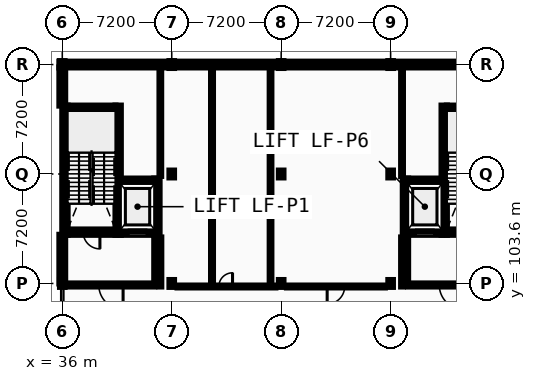
"""IFC4 building model, lengths in metres.
Left out: names, types, materials, properties, quantities, classifications, styles, units other than length and angle.
Written with IfcOpenShell. Run it as: python <this file> out.ifc"""

import sys

from ifc_helpers import new_model, si_unit, direction, frame, frame_2d, origin, origin_2d, place, context, subcontext, project, spatial, rectangle, i_section, extrude, element, fill, save


model = new_model("IFC4")
c1 = context("Model", 3, precision=1e-05, world=origin(), true_north=direction((0.0, 1.0)))
c2 = subcontext(c1, "Body", "Model", "MODEL_VIEW")
j1 = project(units=[si_unit("LENGTHUNIT", "METRE"), si_unit("PLANEANGLEUNIT", "RADIAN")], contexts=[c1])
p1 = place(None, origin())
s1 = spatial("IfcSite", under=j1, at=p1, CompositionType="ELEMENT")
p2 = place(p1, origin())
s2 = spatial("IfcBuilding", under=s1, at=p2, CompositionType="ELEMENT")
p3 = place(p2, frame((0.0, 0.0, 5.2)))
s3 = spatial("IfcBuildingStorey", under=s2, at=p3, CompositionType="ELEMENT", Elevation=5.2)
for number, where, z_axis, x_axis in (
    (1, (36.0, 103.6, 0.0), (0.0, 0.0, 1.0), (1.0, 0.0, 0.0)),
    (2, (36.0, 118.0, 0.0), (0.0, 0.0, 1.0), (1.0, 0.0, 0.0)),
    (3, (43.2, 103.6, 0.0), (0.0, 0.0, 1.0), (1.0, 0.0, 0.0)),
    (4, (43.2, 110.8, 0.0), (0.0, 0.0, 1.0), (1.0, 0.0, 0.0)),
    (5, (43.2, 118.0, 0.0), (0.0, 0.0, 1.0), (1.0, 0.0, 0.0)),
    (6, (50.4, 103.6, 0.0), (0.0, 0.0, 1.0), (1.0, 0.0, 0.0)),
    (7, (50.4, 110.8, 0.0), (0.0, 0.0, 1.0), (1.0, 0.0, 0.0)),
    (8, (50.4, 118.0, 0.0), (0.0, 0.0, 1.0), (1.0, 0.0, 0.0)),
    (9, (57.6, 103.6, 0.0), (0.0, 0.0, 1.0), (1.0, 0.0, 0.0)),
    (10, (57.6, 110.8, 0.0), (0.0, 0.0, 1.0), (1.0, 0.0, 0.0)),
    (11, (57.6, 118.0, 0.0), (0.0, 0.0, 1.0), (1.0, 0.0, 0.0)),
):
    element("IfcColumn", number, at=place(p3, frame(where, z_axis=z_axis, x_axis=x_axis)), inside=s3, PredefinedType="COLUMN", context=c2, shape_type="SweptSolid", body=[
        extrude(i_section(OverallWidth=0.3, OverallDepth=0.45, WebThickness=0.014, FlangeThickness=0.026, FilletRadius=0.027, at=origin_2d()), origin(), (0.0, 0.0, 1.0), 4.4),
    ])
p4 = place(p3, frame((43.2, 118.0, 0.0), z_axis=(0.0, 0.0, 1.0), x_axis=(-1.0, 0.0, 0.0)))
e12 = element("IfcWall", 12, at=p4, inside=s3, PredefinedType="STANDARD", context=c2, shape_type="SweptSolid", body=[
    extrude(rectangle(XDim=7.39, YDim=0.38, at=frame_2d((3.695, 0.0))), origin(), (0.0, 0.0, 1.0), 3.88),
])
p5 = place(p4, frame((1.651, 0.0, 0.95)))
e13 = element("IfcOpeningElement", 13, at=p5, cuts=e12, PredefinedType="OPENING", context=c2, shape_type="SweptSolid", body=[
    extrude(rectangle(XDim=1.132, YDim=1.368, at=frame_2d((0.566, 0.684))), frame((0.0, 0.2, 0.0), z_axis=(0.0, -1.0, 0.0), x_axis=(1.0, 0.0, 0.0)), (0.0, 0.0, 1.0), 0.4),
])
p6 = place(p4, frame((4.607, 0.0, 0.95)))
e14 = element("IfcOpeningElement", 14, at=p6, cuts=e12, PredefinedType="OPENING", context=c2, shape_type="SweptSolid", body=[
    extrude(rectangle(XDim=1.132, YDim=1.368, at=frame_2d((0.566, 0.684))), frame((0.0, 0.2, 0.0), z_axis=(0.0, -1.0, 0.0), x_axis=(1.0, 0.0, 0.0)), (0.0, 0.0, 1.0), 0.4),
])
p7 = place(p3, frame((50.4, 118.0, 0.0), z_axis=(0.0, 0.0, 1.0), x_axis=(-1.0, 0.0, 0.0)))
e15 = element("IfcWall", 15, at=p7, inside=s3, PredefinedType="STANDARD", context=c2, shape_type="SweptSolid", body=[
    extrude(rectangle(XDim=7.2, YDim=0.38, at=frame_2d((3.6, 0.0))), origin(), (0.0, 0.0, 1.0), 3.88),
])
p8 = place(p7, frame((1.577, 0.0, 0.95)))
e16 = element("IfcOpeningElement", 16, at=p8, cuts=e15, PredefinedType="OPENING", context=c2, shape_type="SweptSolid", body=[
    extrude(rectangle(XDim=1.166, YDim=1.368, at=frame_2d((0.583, 0.684))), frame((0.0, 0.2, 0.0), z_axis=(0.0, -1.0, 0.0), x_axis=(1.0, 0.0, 0.0)), (0.0, 0.0, 1.0), 0.4),
])
p9 = place(p3, frame((57.6, 118.0, 0.0), z_axis=(0.0, 0.0, 1.0), x_axis=(-1.0, 0.0, 0.0)))
e17 = element("IfcWall", 17, at=p9, inside=s3, PredefinedType="STANDARD", context=c2, shape_type="SweptSolid", body=[
    extrude(rectangle(XDim=7.2, YDim=0.38, at=frame_2d((3.6, 0.0))), origin(), (0.0, 0.0, 1.0), 3.88),
])
p10 = place(p9, frame((1.56, 0.0, 0.95)))
e18 = element("IfcOpeningElement", 18, at=p10, cuts=e17, PredefinedType="OPENING", context=c2, shape_type="SweptSolid", body=[
    extrude(rectangle(XDim=1.2, YDim=1.368, at=frame_2d((0.6, 0.684))), frame((0.0, 0.2, 0.0), z_axis=(0.0, -1.0, 0.0), x_axis=(1.0, 0.0, 0.0)), (0.0, 0.0, 1.0), 0.4),
])
p11 = place(p9, frame((4.44, 0.0, 0.95)))
e19 = element("IfcOpeningElement", 19, at=p11, cuts=e17, PredefinedType="OPENING", context=c2, shape_type="SweptSolid", body=[
    extrude(rectangle(XDim=1.2, YDim=1.368, at=frame_2d((0.6, 0.684))), frame((0.0, 0.2, 0.0), z_axis=(0.0, -1.0, 0.0), x_axis=(1.0, 0.0, 0.0)), (0.0, 0.0, 1.0), 0.4),
])
p12 = place(p3, frame((64.99, 118.0, 0.0), z_axis=(0.0, 0.0, 1.0), x_axis=(-1.0, 0.0, 0.0)))
e20 = element("IfcWall", 20, at=p12, inside=s3, PredefinedType="STANDARD", context=c2, shape_type="SweptSolid", body=[
    extrude(rectangle(XDim=7.39, YDim=0.38, at=frame_2d((3.695, 0.0))), origin(), (0.0, 0.0, 1.0), 3.88),
])
p13 = place(p12, frame((1.6, 0.0, 0.95)))
e21 = element("IfcOpeningElement", 21, at=p13, cuts=e20, PredefinedType="OPENING", context=c2, shape_type="SweptSolid", body=[
    extrude(rectangle(XDim=1.234, YDim=1.368, at=frame_2d((0.617, 0.684))), frame((0.0, 0.2, 0.0), z_axis=(0.0, -1.0, 0.0), x_axis=(1.0, 0.0, 0.0)), (0.0, 0.0, 1.0), 0.4),
])
p14 = place(p12, frame((4.556, 0.0, 0.95)))
e22 = element("IfcOpeningElement", 22, at=p14, cuts=e20, PredefinedType="OPENING", context=c2, shape_type="SweptSolid", body=[
    extrude(rectangle(XDim=1.234, YDim=1.368, at=frame_2d((0.617, 0.684))), frame((0.0, 0.2, 0.0), z_axis=(0.0, -1.0, 0.0), x_axis=(1.0, 0.0, 0.0)), (0.0, 0.0, 1.0), 0.4),
])
p15 = place(p3, frame((36.0, 106.8, 0.0), z_axis=(0.0, 0.0, 1.0), x_axis=(0.0, -1.0, 0.0)))
e23 = element("IfcWall", 23, at=p15, inside=s3, PredefinedType="STANDARD", context=c2, shape_type="SweptSolid", body=[
    extrude(rectangle(XDim=3.2, YDim=0.38, at=frame_2d((1.6, 0.0))), origin(), (0.0, 0.0, 1.0), 4.185),
])
p16 = place(p15, frame((1.17, 0.0, 0.95)))
e24 = element("IfcOpeningElement", 24, at=p16, cuts=e23, PredefinedType="OPENING", context=c2, shape_type="SweptSolid", body=[
    extrude(rectangle(XDim=0.86, YDim=1.404, at=frame_2d((0.43, 0.702))), frame((0.0, 0.2, 0.0), z_axis=(0.0, -1.0, 0.0), x_axis=(1.0, 0.0, 0.0)), (0.0, 0.0, 1.0), 0.4),
])
p17 = place(p3, frame((36.0, 117.81, 0.0), z_axis=(0.0, 0.0, 1.0), x_axis=(0.0, -1.0, 0.0)))
e25 = element("IfcWall", 25, at=p17, inside=s3, PredefinedType="STANDARD", context=c2, shape_type="SweptSolid", body=[
    extrude(rectangle(XDim=2.51, YDim=0.38, at=frame_2d((1.255, 0.0))), origin(), (0.0, 0.0, 1.0), 4.185),
])
p18 = place(p3, frame((36.35, 106.975, 0.0), z_axis=(0.0, 0.0, 1.0), x_axis=(1.0, 0.0, 0.0)))
e26 = element("IfcWall", 26, at=p18, inside=s3, PredefinedType="SHEAR", context=c2, shape_type="SweptSolid", body=[
    extrude(rectangle(XDim=3.15, YDim=0.35, at=frame_2d((1.575, 0.0))), origin(), (0.0, 0.0, 1.0), 4.185),
])
p19 = place(p18, frame((1.025, 0.0, 0.0)))
e27 = element("IfcOpeningElement", 27, at=p19, cuts=e26, PredefinedType="OPENING", context=c2, shape_type="SweptSolid", body=[
    extrude(rectangle(XDim=1.1, YDim=2.15, at=frame_2d((0.55, 1.075))), frame((0.0, 0.185, 0.0), z_axis=(0.0, -1.0, 0.0), x_axis=(1.0, 0.0, 0.0)), (0.0, 0.0, 1.0), 0.37),
])
p20 = place(p3, frame((36.35, 115.125, 0.0), z_axis=(0.0, 0.0, 1.0), x_axis=(1.0, 0.0, 0.0)))
e28 = element("IfcWall", 28, at=p20, inside=s3, PredefinedType="SHEAR", context=c2, shape_type="SweptSolid", body=[
    extrude(rectangle(XDim=3.15, YDim=0.35, at=frame_2d((1.575, 0.0))), origin(), (0.0, 0.0, 1.0), 4.185),
])
for number, where, z_axis, x_axis in (
    (29, (36.175, 106.8, 0.0), (0.0, 0.0, 1.0), (0.0, 1.0, 0.0)),
    (30, (39.675, 106.8, 0.0), (0.0, 0.0, 1.0), (0.0, 1.0, 0.0)),
):
    element("IfcWall", number, at=place(p3, frame(where, z_axis=z_axis, x_axis=x_axis)), inside=s3, PredefinedType="SHEAR", context=c2, shape_type="SweptSolid", body=[
        extrude(rectangle(XDim=8.5, YDim=0.35, at=frame_2d((4.25, 0.0))), origin(), (0.0, 0.0, 1.0), 4.185),
    ])
p21 = place(p3, frame((39.85, 106.975, 0.0), z_axis=(0.0, 0.0, 1.0), x_axis=(1.0, 0.0, 0.0)))
e31 = element("IfcWall", 31, at=p21, inside=s3, PredefinedType="SHEAR", context=c2, shape_type="SweptSolid", body=[
    extrude(rectangle(XDim=2.2, YDim=0.35, at=frame_2d((1.1, 0.0))), origin(), (0.0, 0.0, 1.0), 4.185),
])
p22 = place(p21, frame((0.5, 0.0, 0.0)))
e32 = element("IfcOpeningElement", 32, at=p22, cuts=e31, PredefinedType="OPENING", context=c2, shape_type="SweptSolid", body=[
    extrude(rectangle(XDim=1.2, YDim=2.2, at=frame_2d((0.6, 1.1))), frame((0.0, 0.185, 0.0), z_axis=(0.0, -1.0, 0.0), x_axis=(1.0, 0.0, 0.0)), (0.0, 0.0, 1.0), 0.37),
])
p23 = place(p3, frame((39.85, 110.325, 0.0), z_axis=(0.0, 0.0, 1.0), x_axis=(1.0, 0.0, 0.0)))
e33 = element("IfcWall", 33, at=p23, inside=s3, PredefinedType="SHEAR", context=c2, shape_type="SweptSolid", body=[
    extrude(rectangle(XDim=2.2, YDim=0.35, at=frame_2d((1.1, 0.0))), origin(), (0.0, 0.0, 1.0), 4.185),
])
p24 = place(p3, frame((42.225, 106.8, 0.0), z_axis=(0.0, 0.0, 1.0), x_axis=(0.0, 1.0, 0.0)))
e34 = element("IfcWall", 34, at=p24, inside=s3, PredefinedType="SHEAR", context=c2, shape_type="SweptSolid", body=[
    extrude(rectangle(XDim=3.7, YDim=0.35, at=frame_2d((1.85, 0.0))), origin(), (0.0, 0.0, 1.0), 4.185),
])
p25 = place(p3, frame((36.35, 103.5, 0.0), z_axis=(0.0, 0.0, 1.0), x_axis=(1.0, 0.0, 0.0)))
e35 = element("IfcWall", 35, at=p25, inside=s3, PredefinedType="PARTITIONING", context=c2, shape_type="SweptSolid", body=[
    extrude(rectangle(XDim=5.7, YDim=0.2, at=frame_2d((2.85, 0.0))), origin(), (0.0, 0.0, 1.0), 3.88),
])
p26 = place(p25, frame((2.05, 0.0, 0.0)))
e36 = element("IfcOpeningElement", 36, at=p26, cuts=e35, PredefinedType="OPENING", context=c2, shape_type="SweptSolid", body=[
    extrude(rectangle(XDim=1.6, YDim=2.2, at=frame_2d((0.8, 1.1))), frame((0.0, 0.11, 0.0), z_axis=(0.0, -1.0, 0.0), x_axis=(1.0, 0.0, 0.0)), (0.0, 0.0, 1.0), 0.22),
])
p27 = place(p3, frame((42.15, 103.6, 0.0), z_axis=(0.0, 0.0, 1.0), x_axis=(0.0, 1.0, 0.0)))
e37 = element("IfcWall", 37, at=p27, inside=s3, PredefinedType="PARTITIONING", context=c2, shape_type="SweptSolid", body=[
    extrude(rectangle(XDim=3.2, YDim=0.2, at=frame_2d((1.6, 0.0))), origin(), (0.0, 0.0, 1.0), 4.185),
])
p28 = place(p3, frame((61.3, 106.975, 0.0), z_axis=(0.0, 0.0, 1.0), x_axis=(1.0, 0.0, 0.0)))
e38 = element("IfcWall", 38, at=p28, inside=s3, PredefinedType="SHEAR", context=c2, shape_type="SweptSolid", body=[
    extrude(rectangle(XDim=3.15, YDim=0.35, at=frame_2d((1.575, 0.0))), origin(), (0.0, 0.0, 1.0), 4.185),
])
p29 = place(p28, frame((1.025, 0.0, 0.0)))
e39 = element("IfcOpeningElement", 39, at=p29, cuts=e38, PredefinedType="OPENING", context=c2, shape_type="SweptSolid", body=[
    extrude(rectangle(XDim=1.1, YDim=2.15, at=frame_2d((0.55, 1.075))), frame((0.0, 0.185, 0.0), z_axis=(0.0, -1.0, 0.0), x_axis=(1.0, 0.0, 0.0)), (0.0, 0.0, 1.0), 0.37),
])
p30 = place(p3, frame((61.3, 115.125, 0.0), z_axis=(0.0, 0.0, 1.0), x_axis=(1.0, 0.0, 0.0)))
e40 = element("IfcWall", 40, at=p30, inside=s3, PredefinedType="SHEAR", context=c2, shape_type="SweptSolid", body=[
    extrude(rectangle(XDim=3.15, YDim=0.35, at=frame_2d((1.575, 0.0))), origin(), (0.0, 0.0, 1.0), 4.185),
])
p31 = place(p3, frame((61.125, 106.8, 0.0), z_axis=(0.0, 0.0, 1.0), x_axis=(0.0, 1.0, 0.0)))
e41 = element("IfcWall", 41, at=p31, inside=s3, PredefinedType="SHEAR", context=c2, shape_type="SweptSolid", body=[
    extrude(rectangle(XDim=8.5, YDim=0.35, at=frame_2d((4.25, 0.0))), origin(), (0.0, 0.0, 1.0), 4.185),
])
p32 = place(p3, frame((58.75, 106.975, 0.0), z_axis=(0.0, 0.0, 1.0), x_axis=(1.0, 0.0, 0.0)))
e42 = element("IfcWall", 42, at=p32, inside=s3, PredefinedType="SHEAR", context=c2, shape_type="SweptSolid", body=[
    extrude(rectangle(XDim=2.2, YDim=0.35, at=frame_2d((1.1, 0.0))), origin(), (0.0, 0.0, 1.0), 4.185),
])
p33 = place(p32, frame((0.5, 0.0, 0.0)))
e43 = element("IfcOpeningElement", 43, at=p33, cuts=e42, PredefinedType="OPENING", context=c2, shape_type="SweptSolid", body=[
    extrude(rectangle(XDim=1.2, YDim=2.2, at=frame_2d((0.6, 1.1))), frame((0.0, 0.185, 0.0), z_axis=(0.0, -1.0, 0.0), x_axis=(1.0, 0.0, 0.0)), (0.0, 0.0, 1.0), 0.37),
])
p34 = place(p3, frame((58.75, 110.325, 0.0), z_axis=(0.0, 0.0, 1.0), x_axis=(1.0, 0.0, 0.0)))
e44 = element("IfcWall", 44, at=p34, inside=s3, PredefinedType="SHEAR", context=c2, shape_type="SweptSolid", body=[
    extrude(rectangle(XDim=2.2, YDim=0.35, at=frame_2d((1.1, 0.0))), origin(), (0.0, 0.0, 1.0), 4.185),
])
p35 = place(p3, frame((58.575, 106.8, 0.0), z_axis=(0.0, 0.0, 1.0), x_axis=(0.0, 1.0, 0.0)))
e45 = element("IfcWall", 45, at=p35, inside=s3, PredefinedType="SHEAR", context=c2, shape_type="SweptSolid", body=[
    extrude(rectangle(XDim=3.7, YDim=0.35, at=frame_2d((1.85, 0.0))), origin(), (0.0, 0.0, 1.0), 4.185),
])
p36 = place(p3, frame((58.75, 103.5, 0.0), z_axis=(0.0, 0.0, 1.0), x_axis=(1.0, 0.0, 0.0)))
e46 = element("IfcWall", 46, at=p36, inside=s3, PredefinedType="PARTITIONING", context=c2, shape_type="SweptSolid", body=[
    extrude(rectangle(XDim=5.7, YDim=0.2, at=frame_2d((2.85, 0.0))), origin(), (0.0, 0.0, 1.0), 3.88),
])
p37 = place(p36, frame((2.05, 0.0, 0.0)))
e47 = element("IfcOpeningElement", 47, at=p37, cuts=e46, PredefinedType="OPENING", context=c2, shape_type="SweptSolid", body=[
    extrude(rectangle(XDim=1.6, YDim=2.2, at=frame_2d((0.8, 1.1))), frame((0.0, 0.11, 0.0), z_axis=(0.0, -1.0, 0.0), x_axis=(1.0, 0.0, 0.0)), (0.0, 0.0, 1.0), 0.22),
])
p38 = place(p3, frame((58.65, 103.6, 0.0), z_axis=(0.0, 0.0, 1.0), x_axis=(0.0, 1.0, 0.0)))
e48 = element("IfcWall", 48, at=p38, inside=s3, PredefinedType="PARTITIONING", context=c2, shape_type="SweptSolid", body=[
    extrude(rectangle(XDim=3.2, YDim=0.2, at=frame_2d((1.6, 0.0))), origin(), (0.0, 0.0, 1.0), 4.185),
])
p39 = place(p3, frame((43.58, 103.4, 0.0), z_axis=(0.0, 0.0, 1.0), x_axis=(1.0, 0.0, 0.0)))
e49 = element("IfcWall", 49, at=p39, inside=s3, PredefinedType="PARTITIONING", context=c2, shape_type="SweptSolid", body=[
    extrude(rectangle(XDim=6.44, YDim=0.125, at=frame_2d((3.22, 0.0))), origin(), (0.0, 0.0, 1.0), 3.88),
])
p40 = place(p39, frame((0.635, 0.0, 0.0)))
e50 = element("IfcOpeningElement", 50, at=p40, cuts=e49, PredefinedType="OPENING", context=c2, shape_type="SweptSolid", body=[
    extrude(rectangle(XDim=1.0, YDim=2.1, at=frame_2d((0.5, 1.05))), frame((0.0, 0.073, 0.0), z_axis=(0.0, -1.0, 0.0), x_axis=(1.0, 0.0, 0.0)), (0.0, 0.0, 1.0), 0.145),
])
p41 = place(p39, frame((2.72, 0.0, 0.0)))
e51 = element("IfcOpeningElement", 51, at=p41, cuts=e49, PredefinedType="OPENING", context=c2, shape_type="SweptSolid", body=[
    extrude(rectangle(XDim=0.9, YDim=2.1, at=frame_2d((0.45, 1.05))), frame((0.0, 0.073, 0.0), z_axis=(0.0, -1.0, 0.0), x_axis=(1.0, 0.0, 0.0)), (0.0, 0.0, 1.0), 0.145),
])
p42 = place(p3, frame((50.78, 103.4, 0.0), z_axis=(0.0, 0.0, 1.0), x_axis=(1.0, 0.0, 0.0)))
e52 = element("IfcWall", 52, at=p42, inside=s3, PredefinedType="PARTITIONING", context=c2, shape_type="SweptSolid", body=[
    extrude(rectangle(XDim=6.44, YDim=0.125, at=frame_2d((3.22, 0.0))), origin(), (0.0, 0.0, 1.0), 3.88),
])
p43 = place(p42, frame((2.645, 0.0, 0.0)))
e53 = element("IfcOpeningElement", 53, at=p43, cuts=e52, PredefinedType="OPENING", context=c2, shape_type="SweptSolid", body=[
    extrude(rectangle(XDim=1.15, YDim=2.15, at=frame_2d((0.575, 1.075))), frame((0.0, 0.073, 0.0), z_axis=(0.0, -1.0, 0.0), x_axis=(1.0, 0.0, 0.0)), (0.0, 0.0, 1.0), 0.145),
])
p44 = place(p3, frame((42.45, 103.4, 0.0), z_axis=(0.0, 0.0, 1.0), x_axis=(0.0, 1.0, 0.0)))
e54 = element("IfcWall", 54, at=p44, inside=s3, PredefinedType="PARTITIONING", context=c2, shape_type="SweptSolid", body=[
    extrude(rectangle(XDim=3.225, YDim=0.125, at=frame_2d((1.613, 0.0))), origin(), (0.0, 0.0, 1.0), 4.185),
])
p45 = place(p3, frame((42.45, 110.675, 0.0), z_axis=(0.0, 0.0, 1.0), x_axis=(0.0, 1.0, 0.0)))
e55 = element("IfcWall", 55, at=p45, inside=s3, PredefinedType="PARTITIONING", context=c2, shape_type="SweptSolid", body=[
    extrude(rectangle(XDim=7.125, YDim=0.11, at=frame_2d((3.562, 0.0))), origin(), (0.0, 0.0, 1.0), 4.185),
])
p46 = place(p3, frame((45.85, 103.462, 0.0), z_axis=(0.0, 0.0, 1.0), x_axis=(0.0, 1.0, 0.0)))
e56 = element("IfcWall", 56, at=p46, inside=s3, PredefinedType="PARTITIONING", context=c2, shape_type="SweptSolid", body=[
    extrude(rectangle(XDim=14.338, YDim=0.125, at=frame_2d((7.169, 0.0))), origin(), (0.0, 0.0, 1.0), 4.185),
])
p47 = place(p3, frame((49.7, 103.462, 0.0), z_axis=(0.0, 0.0, 1.0), x_axis=(0.0, 1.0, 0.0)))
e57 = element("IfcWall", 57, at=p47, inside=s3, PredefinedType="PARTITIONING", context=c2, shape_type="SweptSolid", body=[
    extrude(rectangle(XDim=14.338, YDim=0.11, at=frame_2d((7.169, 0.0))), origin(), (0.0, 0.0, 1.0), 4.185),
])
p48 = place(p3, frame((58.35, 103.4, 0.0), z_axis=(0.0, 0.0, 1.0), x_axis=(0.0, 1.0, 0.0)))
e58 = element("IfcWall", 58, at=p48, inside=s3, PredefinedType="PARTITIONING", context=c2, shape_type="SweptSolid", body=[
    extrude(rectangle(XDim=3.225, YDim=0.118, at=frame_2d((1.613, 0.0))), origin(), (0.0, 0.0, 1.0), 4.185),
])
p49 = place(p3, frame((58.35, 110.675, 0.0), z_axis=(0.0, 0.0, 1.0), x_axis=(0.0, 1.0, 0.0)))
e59 = element("IfcWall", 59, at=p49, inside=s3, PredefinedType="PARTITIONING", context=c2, shape_type="SweptSolid", body=[
    extrude(rectangle(XDim=7.125, YDim=0.118, at=frame_2d((3.562, 0.0))), origin(), (0.0, 0.0, 1.0), 4.185),
])
p50 = place(p5, origin())
e60 = element("IfcWindow", 60, at=p50, inside=s3, PartitioningType="SINGLE_PANEL", PredefinedType="WINDOW", context=c2, shape_type="SweptSolid", body=[
    extrude(rectangle(XDim=1.132, YDim=1.368, at=frame_2d((0.566, 0.684))), frame((0.0, 0.03, 0.0), z_axis=(0.0, -1.0, 0.0), x_axis=(1.0, 0.0, 0.0)), (0.0, 0.0, 1.0), 0.06),
])
fill(e13, e60)
p51 = place(p6, origin())
e61 = element("IfcWindow", 61, at=p51, inside=s3, PartitioningType="SINGLE_PANEL", PredefinedType="WINDOW", context=c2, shape_type="SweptSolid", body=[
    extrude(rectangle(XDim=1.132, YDim=1.368, at=frame_2d((0.566, 0.684))), frame((0.0, 0.03, 0.0), z_axis=(0.0, -1.0, 0.0), x_axis=(1.0, 0.0, 0.0)), (0.0, 0.0, 1.0), 0.06),
])
fill(e14, e61)
p52 = place(p8, origin())
e62 = element("IfcWindow", 62, at=p52, inside=s3, PartitioningType="SINGLE_PANEL", PredefinedType="WINDOW", context=c2, shape_type="SweptSolid", body=[
    extrude(rectangle(XDim=1.166, YDim=1.368, at=frame_2d((0.583, 0.684))), frame((0.0, 0.03, 0.0), z_axis=(0.0, -1.0, 0.0), x_axis=(1.0, 0.0, 0.0)), (0.0, 0.0, 1.0), 0.06),
])
fill(e16, e62)
p53 = place(p10, origin())
e63 = element("IfcWindow", 63, at=p53, inside=s3, PartitioningType="SINGLE_PANEL", PredefinedType="WINDOW", context=c2, shape_type="SweptSolid", body=[
    extrude(rectangle(XDim=1.2, YDim=1.368, at=frame_2d((0.6, 0.684))), frame((0.0, 0.03, 0.0), z_axis=(0.0, -1.0, 0.0), x_axis=(1.0, 0.0, 0.0)), (0.0, 0.0, 1.0), 0.06),
])
fill(e18, e63)
p54 = place(p11, origin())
e64 = element("IfcWindow", 64, at=p54, inside=s3, PartitioningType="SINGLE_PANEL", PredefinedType="WINDOW", context=c2, shape_type="SweptSolid", body=[
    extrude(rectangle(XDim=1.2, YDim=1.368, at=frame_2d((0.6, 0.684))), frame((0.0, 0.03, 0.0), z_axis=(0.0, -1.0, 0.0), x_axis=(1.0, 0.0, 0.0)), (0.0, 0.0, 1.0), 0.06),
])
fill(e19, e64)
p55 = place(p14, origin())
e65 = element("IfcWindow", 65, at=p55, inside=s3, PartitioningType="SINGLE_PANEL", PredefinedType="WINDOW", context=c2, shape_type="SweptSolid", body=[
    extrude(rectangle(XDim=1.234, YDim=1.368, at=frame_2d((0.617, 0.684))), frame((0.0, 0.03, 0.0), z_axis=(0.0, -1.0, 0.0), x_axis=(1.0, 0.0, 0.0)), (0.0, 0.0, 1.0), 0.06),
])
fill(e22, e65)
p56 = place(p16, origin())
e66 = element("IfcWindow", 66, at=p56, inside=s3, PartitioningType="SINGLE_PANEL", PredefinedType="WINDOW", context=c2, shape_type="SweptSolid", body=[
    extrude(rectangle(XDim=0.86, YDim=1.404, at=frame_2d((0.43, 0.702))), frame((0.0, 0.03, 0.0), z_axis=(0.0, -1.0, 0.0), x_axis=(1.0, 0.0, 0.0)), (0.0, 0.0, 1.0), 0.06),
])
fill(e24, e66)
p57 = place(p19, origin())
e67 = element("IfcDoor", 67, at=p57, inside=s3, OperationType="SINGLE_SWING_RIGHT", PredefinedType="DOOR", context=c2, shape_type="SweptSolid", body=[
    extrude(rectangle(XDim=1.1, YDim=2.15, at=frame_2d((0.55, 1.075))), frame((0.0, 0.025, 0.0), z_axis=(0.0, -1.0, 0.0), x_axis=(1.0, 0.0, 0.0)), (0.0, 0.0, 1.0), 0.05),
])
fill(e27, e67)
p58 = place(p22, origin())
e68 = element("IfcDoor", 68, at=p58, inside=s3, OperationType="SLIDING_TO_RIGHT", PredefinedType="DOOR", context=c2, shape_type="SweptSolid", body=[
    extrude(rectangle(XDim=1.2, YDim=2.2, at=frame_2d((0.6, 1.1))), frame((0.0, 0.025, 0.0), z_axis=(0.0, -1.0, 0.0), x_axis=(1.0, 0.0, 0.0)), (0.0, 0.0, 1.0), 0.05),
])
fill(e32, e68)
p59 = place(p26, origin())
e69 = element("IfcDoor", 69, at=p59, inside=s3, OperationType="DOUBLE_DOOR_SINGLE_SWING", PredefinedType="DOOR", context=c2, shape_type="SweptSolid", body=[
    extrude(rectangle(XDim=1.6, YDim=2.2, at=frame_2d((0.8, 1.1))), frame((0.0, 0.025, 0.0), z_axis=(0.0, -1.0, 0.0), x_axis=(1.0, 0.0, 0.0)), (0.0, 0.0, 1.0), 0.05),
])
fill(e36, e69)
p60 = place(p33, origin())
e70 = element("IfcDoor", 70, at=p60, inside=s3, OperationType="SLIDING_TO_RIGHT", PredefinedType="DOOR", context=c2, shape_type="SweptSolid", body=[
    extrude(rectangle(XDim=1.2, YDim=2.2, at=frame_2d((0.6, 1.1))), frame((0.0, 0.025, 0.0), z_axis=(0.0, -1.0, 0.0), x_axis=(1.0, 0.0, 0.0)), (0.0, 0.0, 1.0), 0.05),
])
fill(e43, e70)
p61 = place(p37, origin())
e71 = element("IfcDoor", 71, at=p61, inside=s3, OperationType="DOUBLE_DOOR_SINGLE_SWING", PredefinedType="DOOR", context=c2, shape_type="SweptSolid", body=[
    extrude(rectangle(XDim=1.6, YDim=2.2, at=frame_2d((0.8, 1.1))), frame((0.0, 0.025, 0.0), z_axis=(0.0, -1.0, 0.0), x_axis=(1.0, 0.0, 0.0)), (0.0, 0.0, 1.0), 0.05),
])
fill(e47, e71)
p62 = place(p40, frame((1.0, 0.0, 0.0), z_axis=(0.0, 0.0, 1.0), x_axis=(-1.0, 0.0, 0.0)))
e72 = element("IfcDoor", 72, at=p62, inside=s3, OperationType="SLIDING_TO_LEFT", PredefinedType="DOOR", context=c2, shape_type="SweptSolid", body=[
    extrude(rectangle(XDim=1.0, YDim=2.1, at=frame_2d((0.5, 1.05))), frame((0.0, 0.025, 0.0), z_axis=(0.0, -1.0, 0.0), x_axis=(1.0, 0.0, 0.0)), (0.0, 0.0, 1.0), 0.05),
])
fill(e50, e72)
p63 = place(p41, frame((0.9, 0.0, 0.0), z_axis=(0.0, 0.0, 1.0), x_axis=(-1.0, 0.0, 0.0)))
e73 = element("IfcDoor", 73, at=p63, inside=s3, OperationType="SINGLE_SWING_RIGHT", PredefinedType="DOOR", context=c2, shape_type="SweptSolid", body=[
    extrude(rectangle(XDim=0.9, YDim=2.1, at=frame_2d((0.45, 1.05))), frame((0.0, 0.025, 0.0), z_axis=(0.0, -1.0, 0.0), x_axis=(1.0, 0.0, 0.0)), (0.0, 0.0, 1.0), 0.05),
])
fill(e51, e73)
p64 = place(p43, frame((1.15, 0.0, 0.0), z_axis=(0.0, 0.0, 1.0), x_axis=(-1.0, 0.0, 0.0)))
e74 = element("IfcDoor", 74, at=p64, inside=s3, OperationType="SINGLE_SWING_LEFT", PredefinedType="DOOR", context=c2, shape_type="SweptSolid", body=[
    extrude(rectangle(XDim=1.15, YDim=2.15, at=frame_2d((0.575, 1.075))), frame((0.0, 0.025, 0.0), z_axis=(0.0, -1.0, 0.0), x_axis=(1.0, 0.0, 0.0)), (0.0, 0.0, 1.0), 0.05),
])
fill(e53, e74)
save(model, sys.argv[1])
